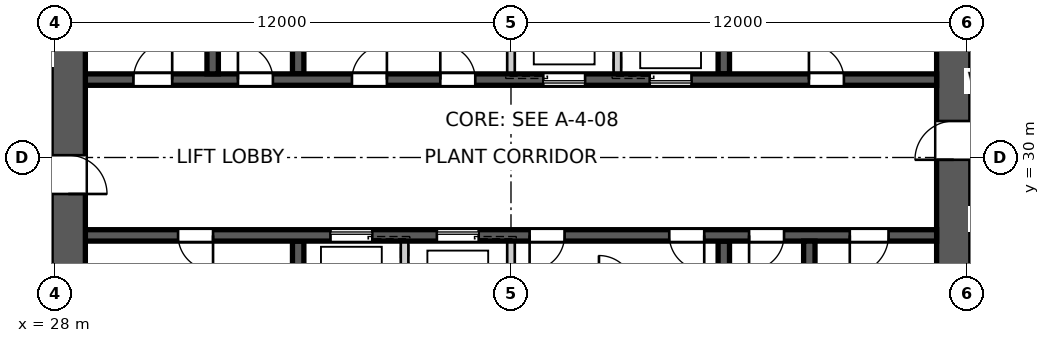
"""IFC4 building model, lengths in metres.
Left out: names, types, materials, properties, quantities, classifications, styles, units other than length and angle.
Written with IfcOpenShell. Run it as: python <this file> out.ifc"""

import sys

from ifc_helpers import new_model, si_unit, direction, frame, frame_2d, origin, place, context, subcontext, project, spatial, polyline, rectangle, outline, extrude, element, fill, save


model = new_model("IFC4")
c1 = context("Model", 3, precision=1e-05, world=origin(), true_north=direction((0.0, 1.0)))
c2 = subcontext(c1, "Body", "Model", "MODEL_VIEW")
j1 = project(units=[si_unit("LENGTHUNIT", "METRE"), si_unit("PLANEANGLEUNIT", "RADIAN")], contexts=[c1])
p1 = place(None, origin())
s1 = spatial("IfcSite", under=j1, at=p1, CompositionType="ELEMENT")
p2 = place(p1, origin())
s2 = spatial("IfcBuilding", under=s1, at=p2, CompositionType="ELEMENT")
p3 = place(p2, frame((0.0, 0.0, 267.6)))
s3 = spatial("IfcBuildingStorey", under=s2, at=p3, CompositionType="ELEMENT", Elevation=267.6)
p4 = place(p3, frame((51.65, 18.8, 0.0), z_axis=(0.0, 0.0, 1.0), x_axis=(0.0, 1.0, 0.0)))
e1 = element("IfcWall", 1, at=p4, inside=s3, PredefinedType="SHEAR", context=c2, shape_type="SweptSolid", body=[
    extrude(outline(polyline([(0.0, -0.45), (22.4, -0.45), (22.4, -0.025), (22.85, -0.025), (22.85, 0.025), (22.4, 0.025), (22.4, 0.45), (0.0, 0.45), (0.0, 0.025), (-0.45, 0.025), (-0.45, -0.025), (0.0, -0.025), (0.0, -0.45)])), origin(), (0.0, 0.0, 1.0), 5.0),
])
p5 = place(p4, frame((11.14, 0.0, 0.0)))
e2 = element("IfcOpeningElement", 2, at=p5, cuts=e1, PredefinedType="OPENING", context=c2, shape_type="SweptSolid", body=[
    extrude(rectangle(XDim=1.02, YDim=2.4, at=frame_2d((0.51, 1.2))), frame((0.0, 0.46, 0.0), z_axis=(0.0, -1.0, 0.0), x_axis=(1.0, 0.0, 0.0)), (0.0, 0.0, 1.0), 0.92),
])
p6 = place(p3, frame((28.35, 41.2, 0.0), z_axis=(0.0, 0.0, 1.0), x_axis=(0.0, -1.0, 0.0)))
e3 = element("IfcWall", 3, at=p6, inside=s3, PredefinedType="SHEAR", context=c2, shape_type="SweptSolid", body=[
    extrude(outline(polyline([(0.0, -0.45), (22.4, -0.45), (22.4, -0.025), (22.85, -0.025), (22.85, 0.025), (22.4, 0.025), (22.4, 0.45), (0.0, 0.45), (0.0, 0.025), (-0.45, 0.025), (-0.45, -0.025), (0.0, -0.025), (0.0, -0.45)])), origin(), (0.0, 0.0, 1.0), 5.0),
])
p7 = place(p6, frame((11.14, 0.0, 0.0)))
e4 = element("IfcOpeningElement", 4, at=p7, cuts=e3, PredefinedType="OPENING", context=c2, shape_type="SweptSolid", body=[
    extrude(rectangle(XDim=1.02, YDim=2.4, at=frame_2d((0.51, 1.2))), frame((0.0, 0.46, 0.0), z_axis=(0.0, -1.0, 0.0), x_axis=(1.0, 0.0, 0.0)), (0.0, 0.0, 1.0), 0.92),
])
p8 = place(p3, frame((28.8, 32.05, 0.0), z_axis=(0.0, 0.0, 1.0), x_axis=(1.0, 0.0, 0.0)))
e5 = element("IfcWall", 5, at=p8, inside=s3, PredefinedType="SHEAR", context=c2, shape_type="SweptSolid", body=[
    extrude(rectangle(XDim=22.4, YDim=0.3, at=frame_2d((11.2, 0.0))), origin(), (0.0, 0.0, 1.0), 5.0),
])
p9 = place(p8, frame((19.04, 0.0, 0.0)))
e6 = element("IfcOpeningElement", 6, at=p9, cuts=e5, PredefinedType="OPENING", context=c2, shape_type="SweptSolid", body=[
    extrude(rectangle(XDim=0.92, YDim=2.1, at=frame_2d((0.46, 1.05))), frame((0.0, 0.16, 0.0), z_axis=(0.0, -1.0, 0.0), x_axis=(1.0, 0.0, 0.0)), (0.0, 0.0, 1.0), 0.32),
])
p10 = place(p8, frame((1.265, 0.0, 0.0)))
e7 = element("IfcOpeningElement", 7, at=p10, cuts=e5, PredefinedType="OPENING", context=c2, shape_type="SweptSolid", body=[
    extrude(rectangle(XDim=1.02, YDim=2.1, at=frame_2d((0.51, 1.05))), frame((0.0, 0.16, 0.0), z_axis=(0.0, -1.0, 0.0), x_axis=(1.0, 0.0, 0.0)), (0.0, 0.0, 1.0), 0.32),
])
p11 = place(p8, frame((4.015, 0.0, 0.0)))
e8 = element("IfcOpeningElement", 8, at=p11, cuts=e5, PredefinedType="OPENING", context=c2, shape_type="SweptSolid", body=[
    extrude(rectangle(XDim=0.92, YDim=2.1, at=frame_2d((0.46, 1.05))), frame((0.0, 0.16, 0.0), z_axis=(0.0, -1.0, 0.0), x_axis=(1.0, 0.0, 0.0)), (0.0, 0.0, 1.0), 0.32),
])
p12 = place(p8, frame((7.015, 0.0, 0.0)))
e9 = element("IfcOpeningElement", 9, at=p12, cuts=e5, PredefinedType="OPENING", context=c2, shape_type="SweptSolid", body=[
    extrude(rectangle(XDim=0.92, YDim=2.1, at=frame_2d((0.46, 1.05))), frame((0.0, 0.16, 0.0), z_axis=(0.0, -1.0, 0.0), x_axis=(1.0, 0.0, 0.0)), (0.0, 0.0, 1.0), 0.32),
])
p13 = place(p8, frame((9.34, 0.0, 0.0)))
e10 = element("IfcOpeningElement", 10, at=p13, cuts=e5, PredefinedType="OPENING", context=c2, shape_type="SweptSolid", body=[
    extrude(rectangle(XDim=0.92, YDim=2.1, at=frame_2d((0.46, 1.05))), frame((0.0, 0.16, 0.0), z_axis=(0.0, -1.0, 0.0), x_axis=(1.0, 0.0, 0.0)), (0.0, 0.0, 1.0), 0.32),
])
p14 = place(p8, frame((12.05, 0.0, 0.0)))
e11 = element("IfcOpeningElement", 11, at=p14, cuts=e5, PredefinedType="OPENING", context=c2, shape_type="SweptSolid", body=[
    extrude(rectangle(XDim=1.1, YDim=2.1, at=frame_2d((0.55, 1.05))), frame((0.0, 0.16, 0.0), z_axis=(0.0, -1.0, 0.0), x_axis=(1.0, 0.0, 0.0)), (0.0, 0.0, 1.0), 0.32),
])
p15 = place(p8, frame((14.85, 0.0, 0.0)))
e12 = element("IfcOpeningElement", 12, at=p15, cuts=e5, PredefinedType="OPENING", context=c2, shape_type="SweptSolid", body=[
    extrude(rectangle(XDim=1.1, YDim=2.1, at=frame_2d((0.55, 1.05))), frame((0.0, 0.16, 0.0), z_axis=(0.0, -1.0, 0.0), x_axis=(1.0, 0.0, 0.0)), (0.0, 0.0, 1.0), 0.32),
])
p16 = place(p3, frame((51.2, 27.95, 0.0), z_axis=(0.0, 0.0, 1.0), x_axis=(-1.0, 0.0, 0.0)))
e13 = element("IfcWall", 13, at=p16, inside=s3, PredefinedType="SHEAR", context=c2, shape_type="SweptSolid", body=[
    extrude(rectangle(XDim=22.4, YDim=0.3, at=frame_2d((11.2, 0.0))), origin(), (0.0, 0.0, 1.0), 5.0),
])
p17 = place(p16, frame((19.04, 0.0, 0.0)))
e14 = element("IfcOpeningElement", 14, at=p17, cuts=e13, PredefinedType="OPENING", context=c2, shape_type="SweptSolid", body=[
    extrude(rectangle(XDim=0.92, YDim=2.1, at=frame_2d((0.46, 1.05))), frame((0.0, 0.16, 0.0), z_axis=(0.0, -1.0, 0.0), x_axis=(1.0, 0.0, 0.0)), (0.0, 0.0, 1.0), 0.32),
])
p18 = place(p16, frame((1.265, 0.0, 0.0)))
e15 = element("IfcOpeningElement", 15, at=p18, cuts=e13, PredefinedType="OPENING", context=c2, shape_type="SweptSolid", body=[
    extrude(rectangle(XDim=1.02, YDim=2.1, at=frame_2d((0.51, 1.05))), frame((0.0, 0.16, 0.0), z_axis=(0.0, -1.0, 0.0), x_axis=(1.0, 0.0, 0.0)), (0.0, 0.0, 1.0), 0.32),
])
p19 = place(p16, frame((4.015, 0.0, 0.0)))
e16 = element("IfcOpeningElement", 16, at=p19, cuts=e13, PredefinedType="OPENING", context=c2, shape_type="SweptSolid", body=[
    extrude(rectangle(XDim=0.92, YDim=2.1, at=frame_2d((0.46, 1.05))), frame((0.0, 0.16, 0.0), z_axis=(0.0, -1.0, 0.0), x_axis=(1.0, 0.0, 0.0)), (0.0, 0.0, 1.0), 0.32),
])
p20 = place(p16, frame((9.79, 0.0, 0.0)))
e17 = element("IfcOpeningElement", 17, at=p20, cuts=e13, PredefinedType="OPENING", context=c2, shape_type="SweptSolid", body=[
    extrude(rectangle(XDim=0.92, YDim=2.1, at=frame_2d((0.46, 1.05))), frame((0.0, 0.16, 0.0), z_axis=(0.0, -1.0, 0.0), x_axis=(1.0, 0.0, 0.0)), (0.0, 0.0, 1.0), 0.32),
])
p21 = place(p16, frame((6.115, 0.0, 0.0)))
e18 = element("IfcOpeningElement", 18, at=p21, cuts=e13, PredefinedType="OPENING", context=c2, shape_type="SweptSolid", body=[
    extrude(rectangle(XDim=0.92, YDim=2.1, at=frame_2d((0.46, 1.05))), frame((0.0, 0.16, 0.0), z_axis=(0.0, -1.0, 0.0), x_axis=(1.0, 0.0, 0.0)), (0.0, 0.0, 1.0), 0.32),
])
p22 = place(p16, frame((12.05, 0.0, 0.0)))
e19 = element("IfcOpeningElement", 19, at=p22, cuts=e13, PredefinedType="OPENING", context=c2, shape_type="SweptSolid", body=[
    extrude(rectangle(XDim=1.1, YDim=2.1, at=frame_2d((0.55, 1.05))), frame((0.0, 0.16, 0.0), z_axis=(0.0, -1.0, 0.0), x_axis=(1.0, 0.0, 0.0)), (0.0, 0.0, 1.0), 0.32),
])
p23 = place(p16, frame((14.85, 0.0, 0.0)))
e20 = element("IfcOpeningElement", 20, at=p23, cuts=e13, PredefinedType="OPENING", context=c2, shape_type="SweptSolid", body=[
    extrude(rectangle(XDim=1.1, YDim=2.1, at=frame_2d((0.55, 1.05))), frame((0.0, 0.16, 0.0), z_axis=(0.0, -1.0, 0.0), x_axis=(1.0, 0.0, 0.0)), (0.0, 0.0, 1.0), 0.32),
])
for number, where, z_axis, x_axis in (
    (21, (34.4, 32.2, 0.0), (0.0, 0.0, 1.0), (0.0, 1.0, 0.0)),
    (22, (45.6, 27.8, 0.0), (0.0, 0.0, 1.0), (0.0, -1.0, 0.0)),
):
    element("IfcWall", number, at=place(p3, frame(where, z_axis=z_axis, x_axis=x_axis)), inside=s3, PredefinedType="SHEAR", context=c2, shape_type="SweptSolid", body=[
        extrude(rectangle(XDim=2.8, YDim=0.3, at=frame_2d((1.4, 0.0))), origin(), (0.0, 0.0, 1.0), 5.0),
    ])
for number, where, z_axis, x_axis in (
    (23, (40.0, 32.2, 0.0), (0.0, 0.0, 1.0), (0.0, 1.0, 0.0)),
    (24, (40.0, 27.8, 0.0), (0.0, 0.0, 1.0), (0.0, -1.0, 0.0)),
    (25, (42.8, 32.2, 0.0), (0.0, 0.0, 1.0), (0.0, 1.0, 0.0)),
    (26, (37.2, 27.8, 0.0), (0.0, 0.0, 1.0), (0.0, -1.0, 0.0)),
):
    element("IfcWall", number, at=place(p3, frame(where, z_axis=z_axis, x_axis=x_axis)), inside=s3, PredefinedType="SOLIDWALL", context=c2, shape_type="SweptSolid", body=[
        extrude(rectangle(XDim=2.8, YDim=0.2, at=frame_2d((1.4, 0.0))), origin(), (0.0, 0.0, 1.0), 5.0),
    ])
for number, where, z_axis, x_axis in (
    (27, (45.6, 32.2, 0.0), (0.0, 0.0, 1.0), (0.0, 1.0, 0.0)),
    (28, (34.4, 27.8, 0.0), (0.0, 0.0, 1.0), (0.0, -1.0, 0.0)),
):
    element("IfcWall", number, at=place(p3, frame(where, z_axis=z_axis, x_axis=x_axis)), inside=s3, PredefinedType="SHEAR", context=c2, shape_type="SweptSolid", body=[
        extrude(rectangle(XDim=2.8, YDim=0.3, at=frame_2d((1.4, 0.0))), origin(), (0.0, 0.0, 1.0), 5.0),
    ])
for number, where, z_axis, x_axis in (
    (29, (32.15, 32.2, 0.0), (0.0, 0.0, 1.0), (0.0, 1.0, 0.0)),
    (30, (47.85, 27.8, 0.0), (0.0, 0.0, 1.0), (0.0, -1.0, 0.0)),
):
    element("IfcWall", number, at=place(p3, frame(where, z_axis=z_axis, x_axis=x_axis)), inside=s3, PredefinedType="SHEAR", context=c2, shape_type="SweptSolid", body=[
        extrude(rectangle(XDim=7.7, YDim=0.3, at=frame_2d((3.85, 0.0))), origin(), (0.0, 0.0, 1.0), 5.0),
    ])
p24 = place(p9, origin())
e31 = element("IfcDoor", 31, at=p24, inside=s3, OperationType="SINGLE_SWING_LEFT", PredefinedType="DOOR", context=c2, shape_type="SweptSolid", body=[
    extrude(rectangle(XDim=0.92, YDim=2.1, at=frame_2d((0.46, 1.05))), frame((0.0, 0.025, 0.0), z_axis=(0.0, -1.0, 0.0), x_axis=(1.0, 0.0, 0.0)), (0.0, 0.0, 1.0), 0.05),
])
fill(e6, e31)
p25 = place(p17, origin())
e32 = element("IfcDoor", 32, at=p25, inside=s3, OperationType="SINGLE_SWING_LEFT", PredefinedType="DOOR", context=c2, shape_type="SweptSolid", body=[
    extrude(rectangle(XDim=0.92, YDim=2.1, at=frame_2d((0.46, 1.05))), frame((0.0, 0.025, 0.0), z_axis=(0.0, -1.0, 0.0), x_axis=(1.0, 0.0, 0.0)), (0.0, 0.0, 1.0), 0.05),
])
fill(e14, e32)
p26 = place(p18, origin())
e33 = element("IfcDoor", 33, at=p26, inside=s3, OperationType="SINGLE_SWING_RIGHT", PredefinedType="DOOR", context=c2, shape_type="SweptSolid", body=[
    extrude(rectangle(XDim=1.02, YDim=2.1, at=frame_2d((0.51, 1.05))), frame((0.0, 0.025, 0.0), z_axis=(0.0, -1.0, 0.0), x_axis=(1.0, 0.0, 0.0)), (0.0, 0.0, 1.0), 0.05),
])
fill(e15, e33)
p27 = place(p10, origin())
e34 = element("IfcDoor", 34, at=p27, inside=s3, OperationType="SINGLE_SWING_RIGHT", PredefinedType="DOOR", context=c2, shape_type="SweptSolid", body=[
    extrude(rectangle(XDim=1.02, YDim=2.1, at=frame_2d((0.51, 1.05))), frame((0.0, 0.025, 0.0), z_axis=(0.0, -1.0, 0.0), x_axis=(1.0, 0.0, 0.0)), (0.0, 0.0, 1.0), 0.05),
])
fill(e7, e34)
p28 = place(p11, origin())
e35 = element("IfcDoor", 35, at=p28, inside=s3, OperationType="SINGLE_SWING_LEFT", PredefinedType="DOOR", context=c2, shape_type="SweptSolid", body=[
    extrude(rectangle(XDim=0.92, YDim=2.1, at=frame_2d((0.46, 1.05))), frame((0.0, 0.025, 0.0), z_axis=(0.0, -1.0, 0.0), x_axis=(1.0, 0.0, 0.0)), (0.0, 0.0, 1.0), 0.05),
])
fill(e8, e35)
p29 = place(p19, origin())
e36 = element("IfcDoor", 36, at=p29, inside=s3, OperationType="SINGLE_SWING_RIGHT", PredefinedType="DOOR", context=c2, shape_type="SweptSolid", body=[
    extrude(rectangle(XDim=0.92, YDim=2.1, at=frame_2d((0.46, 1.05))), frame((0.0, 0.025, 0.0), z_axis=(0.0, -1.0, 0.0), x_axis=(1.0, 0.0, 0.0)), (0.0, 0.0, 1.0), 0.05),
])
fill(e16, e36)
p30 = place(p12, origin())
e37 = element("IfcDoor", 37, at=p30, inside=s3, OperationType="SINGLE_SWING_RIGHT", PredefinedType="DOOR", context=c2, shape_type="SweptSolid", body=[
    extrude(rectangle(XDim=0.92, YDim=2.1, at=frame_2d((0.46, 1.05))), frame((0.0, 0.025, 0.0), z_axis=(0.0, -1.0, 0.0), x_axis=(1.0, 0.0, 0.0)), (0.0, 0.0, 1.0), 0.05),
])
fill(e9, e37)
p31 = place(p13, origin())
e38 = element("IfcDoor", 38, at=p31, inside=s3, OperationType="SINGLE_SWING_LEFT", PredefinedType="DOOR", context=c2, shape_type="SweptSolid", body=[
    extrude(rectangle(XDim=0.92, YDim=2.1, at=frame_2d((0.46, 1.05))), frame((0.0, 0.025, 0.0), z_axis=(0.0, -1.0, 0.0), x_axis=(1.0, 0.0, 0.0)), (0.0, 0.0, 1.0), 0.05),
])
fill(e10, e38)
p32 = place(p20, origin())
e39 = element("IfcDoor", 39, at=p32, inside=s3, OperationType="SINGLE_SWING_RIGHT", PredefinedType="DOOR", context=c2, shape_type="SweptSolid", body=[
    extrude(rectangle(XDim=0.92, YDim=2.1, at=frame_2d((0.46, 1.05))), frame((0.0, 0.025, 0.0), z_axis=(0.0, -1.0, 0.0), x_axis=(1.0, 0.0, 0.0)), (0.0, 0.0, 1.0), 0.05),
])
fill(e17, e39)
p33 = place(p21, origin())
e40 = element("IfcDoor", 40, at=p33, inside=s3, OperationType="SINGLE_SWING_LEFT", PredefinedType="DOOR", context=c2, shape_type="SweptSolid", body=[
    extrude(rectangle(XDim=0.92, YDim=2.1, at=frame_2d((0.46, 1.05))), frame((0.0, 0.025, 0.0), z_axis=(0.0, -1.0, 0.0), x_axis=(1.0, 0.0, 0.0)), (0.0, 0.0, 1.0), 0.05),
])
fill(e18, e40)
p34 = place(p5, origin())
e41 = element("IfcDoor", 41, at=p34, inside=s3, OperationType="SINGLE_SWING_LEFT", PredefinedType="DOOR", context=c2, shape_type="SweptSolid", body=[
    extrude(rectangle(XDim=1.02, YDim=2.4, at=frame_2d((0.51, 1.2))), frame((0.0, 0.025, 0.0), z_axis=(0.0, -1.0, 0.0), x_axis=(1.0, 0.0, 0.0)), (0.0, 0.0, 1.0), 0.05),
])
fill(e2, e41)
p35 = place(p7, origin())
e42 = element("IfcDoor", 42, at=p35, inside=s3, OperationType="SINGLE_SWING_RIGHT", PredefinedType="DOOR", context=c2, shape_type="SweptSolid", body=[
    extrude(rectangle(XDim=1.02, YDim=2.4, at=frame_2d((0.51, 1.2))), frame((0.0, 0.025, 0.0), z_axis=(0.0, -1.0, 0.0), x_axis=(1.0, 0.0, 0.0)), (0.0, 0.0, 1.0), 0.05),
])
fill(e4, e42)
p36 = place(p14, origin())
e43 = element("IfcDoor", 43, at=p36, inside=s3, OperationType="SLIDING_TO_LEFT", PredefinedType="DOOR", context=c2, shape_type="SweptSolid", body=[
    extrude(rectangle(XDim=1.1, YDim=2.1, at=frame_2d((0.55, 1.05))), frame((0.0, 0.025, 0.0), z_axis=(0.0, -1.0, 0.0), x_axis=(1.0, 0.0, 0.0)), (0.0, 0.0, 1.0), 0.05),
])
fill(e11, e43)
p37 = place(p22, origin())
e44 = element("IfcDoor", 44, at=p37, inside=s3, OperationType="SLIDING_TO_LEFT", PredefinedType="DOOR", context=c2, shape_type="SweptSolid", body=[
    extrude(rectangle(XDim=1.1, YDim=2.1, at=frame_2d((0.55, 1.05))), frame((0.0, 0.025, 0.0), z_axis=(0.0, -1.0, 0.0), x_axis=(1.0, 0.0, 0.0)), (0.0, 0.0, 1.0), 0.05),
])
fill(e19, e44)
p38 = place(p15, origin())
e45 = element("IfcDoor", 45, at=p38, inside=s3, OperationType="SLIDING_TO_LEFT", PredefinedType="DOOR", context=c2, shape_type="SweptSolid", body=[
    extrude(rectangle(XDim=1.1, YDim=2.1, at=frame_2d((0.55, 1.05))), frame((0.0, 0.025, 0.0), z_axis=(0.0, -1.0, 0.0), x_axis=(1.0, 0.0, 0.0)), (0.0, 0.0, 1.0), 0.05),
])
fill(e12, e45)
p39 = place(p23, origin())
e46 = element("IfcDoor", 46, at=p39, inside=s3, OperationType="SLIDING_TO_LEFT", PredefinedType="DOOR", context=c2, shape_type="SweptSolid", body=[
    extrude(rectangle(XDim=1.1, YDim=2.1, at=frame_2d((0.55, 1.05))), frame((0.0, 0.025, 0.0), z_axis=(0.0, -1.0, 0.0), x_axis=(1.0, 0.0, 0.0)), (0.0, 0.0, 1.0), 0.05),
])
fill(e20, e46)
save(model, sys.argv[1])
